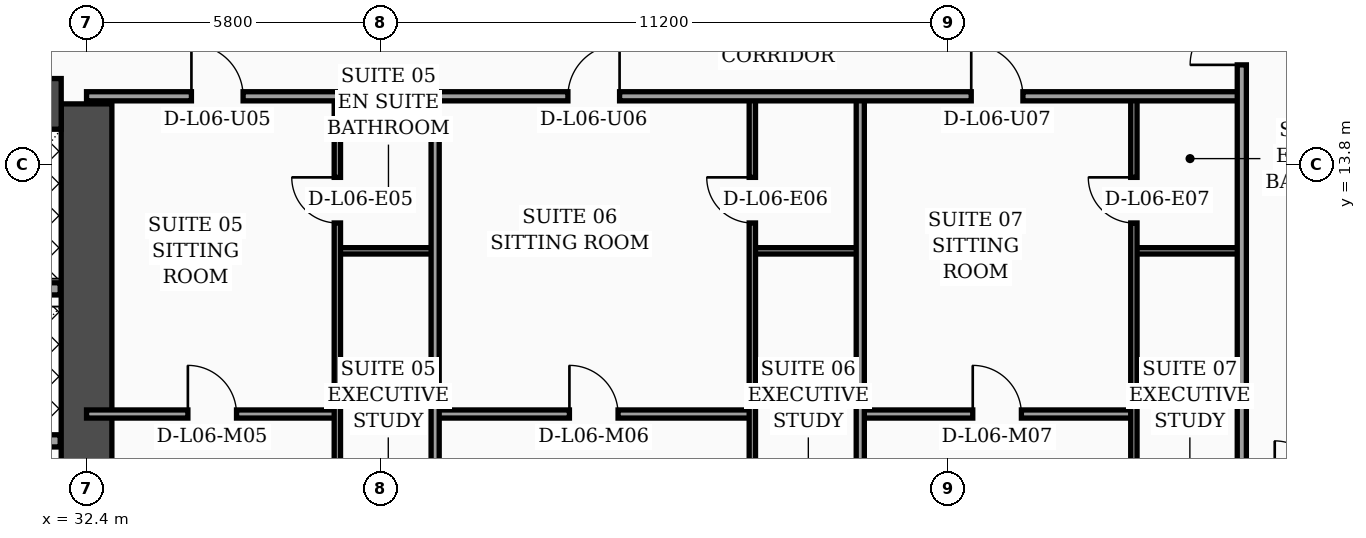
"""IFC4 building model, lengths in metres.
Left out: names, types, materials, properties, quantities, classifications, styles, units other than length and angle.
Written with IfcOpenShell. Run it as: python <this file> out.ifc"""

import sys

from ifc_helpers import new_model, si_unit, direction, frame, frame_2d, origin, place, context, subcontext, project, spatial, rectangle, extrude, element, fill, save


model = new_model("IFC4")
c1 = context("Model", 3, precision=1e-05, world=origin(), true_north=direction((0.0, 1.0)))
c2 = subcontext(c1, "Body", "Model", "MODEL_VIEW")
j1 = project(units=[si_unit("LENGTHUNIT", "METRE"), si_unit("PLANEANGLEUNIT", "RADIAN")], contexts=[c1])
p1 = place(None, origin())
s1 = spatial("IfcSite", under=j1, at=p1, CompositionType="ELEMENT")
p2 = place(p1, origin())
s2 = spatial("IfcBuilding", under=s1, at=p2, CompositionType="ELEMENT")
p3 = place(p2, frame((0.0, 0.0, 30.8)))
s3 = spatial("IfcBuildingStorey", under=s2, at=p3, CompositionType="ELEMENT", Elevation=30.8)
p4 = place(p3, frame((32.4, 4.6, 0.0), z_axis=(0.0, 0.0, 1.0), x_axis=(0.0, 1.0, 0.0)))
e1 = element("IfcWall", 1, at=p4, inside=s3, PredefinedType="SHEAR", context=c2, shape_type="SweptSolid", body=[
    extrude(rectangle(XDim=10.4, YDim=1.0, at=frame_2d((5.2, 0.0))), origin(), (0.0, 0.0, 1.0), 3.56),
])
p5 = place(p3, frame((22.1, 15.0, 0.0), z_axis=(0.0, 0.0, 1.0), x_axis=(1.0, 0.0, 0.0)))
e2 = element("IfcWall", 2, at=p5, inside=s3, PredefinedType="SHEAR", context=c2, shape_type="SweptSolid", body=[
    extrude(rectangle(XDim=9.8, YDim=1.0, at=frame_2d((4.9, 0.0))), origin(), (0.0, 0.0, 1.0), 3.56),
])
p6 = place(p5, frame((4.8, 0.0, 0.0)))
e3 = element("IfcOpeningElement", 3, at=p6, cuts=e2, PredefinedType="OPENING", context=c2, shape_type="SweptSolid", body=[
    extrude(rectangle(XDim=1.1, YDim=2.2, at=frame_2d((0.55, 1.1))), frame((0.0, 0.51, 0.0), z_axis=(0.0, -1.0, 0.0), x_axis=(1.0, 0.0, 0.0)), (0.0, 0.0, 1.0), 1.02),
])
p7 = place(p3, frame((63.63, 5.505, 0.0), z_axis=(0.0, 0.0, 1.0), x_axis=(-0.300501856448, 0.953781229775, 0.0)))
e4 = element("IfcWall", 4, at=p7, inside=s3, PredefinedType="SOLIDWALL", context=c2, shape_type="SweptSolid", body=[
    extrude(rectangle(XDim=30.814, YDim=0.32, at=frame_2d((15.407, 0.0))), origin(), (0.0, 0.0, 1.0), 3.56),
])
p8 = place(p7, frame((4.747, 0.0, 0.0)))
e5 = element("IfcOpeningElement", 5, at=p8, cuts=e4, PredefinedType="OPENING", context=c2, shape_type="SweptSolid", body=[
    extrude(rectangle(XDim=1.4, YDim=2.25, at=frame_2d((0.7, 1.125))), frame((0.0, 0.17, 0.0), z_axis=(0.0, -1.0, 0.0), x_axis=(1.0, 0.0, 0.0)), (0.0, 0.0, 1.0), 0.34),
])
p9 = place(p7, frame((2.65, 0.0, 0.75)))
e6 = element("IfcOpeningElement", 6, at=p9, cuts=e4, PredefinedType="OPENING", context=c2, shape_type="SweptSolid", body=[
    extrude(rectangle(XDim=1.5, YDim=1.6, at=frame_2d((0.75, 0.8))), frame((0.0, 0.17, 0.0), z_axis=(0.0, -1.0, 0.0), x_axis=(1.0, 0.0, 0.0)), (0.0, 0.0, 1.0), 0.34),
])
p10 = place(p7, frame((7.8, 0.0, 0.75)))
e7 = element("IfcOpeningElement", 7, at=p10, cuts=e4, PredefinedType="OPENING", context=c2, shape_type="SweptSolid", body=[
    extrude(rectangle(XDim=1.5, YDim=1.6, at=frame_2d((0.75, 0.8))), frame((0.0, 0.17, 0.0), z_axis=(0.0, -1.0, 0.0), x_axis=(1.0, 0.0, 0.0)), (0.0, 0.0, 1.0), 0.34),
])
p11 = place(p7, frame((10.9, 0.0, 0.75)))
e8 = element("IfcOpeningElement", 8, at=p11, cuts=e4, PredefinedType="OPENING", context=c2, shape_type="SweptSolid", body=[
    extrude(rectangle(XDim=1.5, YDim=1.6, at=frame_2d((0.75, 0.8))), frame((0.0, 0.17, 0.0), z_axis=(0.0, -1.0, 0.0), x_axis=(1.0, 0.0, 0.0)), (0.0, 0.0, 1.0), 0.34),
])
p12 = place(p7, frame((14.0, 0.0, 0.75)))
e9 = element("IfcOpeningElement", 9, at=p12, cuts=e4, PredefinedType="OPENING", context=c2, shape_type="SweptSolid", body=[
    extrude(rectangle(XDim=1.5, YDim=1.6, at=frame_2d((0.75, 0.8))), frame((0.0, 0.17, 0.0), z_axis=(0.0, -1.0, 0.0), x_axis=(1.0, 0.0, 0.0)), (0.0, 0.0, 1.0), 0.34),
])
p13 = place(p7, frame((17.1, 0.0, 0.75)))
e10 = element("IfcOpeningElement", 10, at=p13, cuts=e4, PredefinedType="OPENING", context=c2, shape_type="SweptSolid", body=[
    extrude(rectangle(XDim=1.5, YDim=1.6, at=frame_2d((0.75, 0.8))), frame((0.0, 0.17, 0.0), z_axis=(0.0, -1.0, 0.0), x_axis=(1.0, 0.0, 0.0)), (0.0, 0.0, 1.0), 0.34),
])
p14 = place(p7, frame((20.2, 0.0, 0.75)))
e11 = element("IfcOpeningElement", 11, at=p14, cuts=e4, PredefinedType="OPENING", context=c2, shape_type="SweptSolid", body=[
    extrude(rectangle(XDim=1.5, YDim=1.6, at=frame_2d((0.75, 0.8))), frame((0.0, 0.17, 0.0), z_axis=(0.0, -1.0, 0.0), x_axis=(1.0, 0.0, 0.0)), (0.0, 0.0, 1.0), 0.34),
])
p15 = place(p7, frame((23.3, 0.0, 0.75)))
e12 = element("IfcOpeningElement", 12, at=p15, cuts=e4, PredefinedType="OPENING", context=c2, shape_type="SweptSolid", body=[
    extrude(rectangle(XDim=1.5, YDim=1.6, at=frame_2d((0.75, 0.8))), frame((0.0, 0.17, 0.0), z_axis=(0.0, -1.0, 0.0), x_axis=(1.0, 0.0, 0.0)), (0.0, 0.0, 1.0), 0.34),
])
p16 = place(p7, frame((26.4, 0.0, 0.75)))
e13 = element("IfcOpeningElement", 13, at=p16, cuts=e4, PredefinedType="OPENING", context=c2, shape_type="SweptSolid", body=[
    extrude(rectangle(XDim=1.5, YDim=1.6, at=frame_2d((0.75, 0.8))), frame((0.0, 0.17, 0.0), z_axis=(0.0, -1.0, 0.0), x_axis=(1.0, 0.0, 0.0)), (0.0, 0.0, 1.0), 0.34),
])
p17 = place(p3, frame((27.02, 11.35, 0.0), z_axis=(0.0, 0.0, 1.0), x_axis=(1.0, 0.0, 0.0)))
e14 = element("IfcWall", 14, at=p17, inside=s3, PredefinedType="SOLIDWALL", context=c2, shape_type="SweptSolid", body=[
    extrude(rectangle(XDim=4.86, YDim=0.24, at=frame_2d((2.43, 0.0))), origin(), (0.0, 0.0, 1.0), 3.56),
])
p18 = place(p17, frame((0.45, 0.0, 0.0)))
e15 = element("IfcOpeningElement", 15, at=p18, cuts=e14, PredefinedType="OPENING", context=c2, shape_type="SweptSolid", body=[
    extrude(rectangle(XDim=1.3, YDim=2.35, at=frame_2d((0.65, 1.175))), frame((0.0, 0.13, 0.0), z_axis=(0.0, -1.0, 0.0), x_axis=(1.0, 0.0, 0.0)), (0.0, 0.0, 1.0), 0.26),
])
p19 = place(p3, frame((27.02, 8.35, 0.0), z_axis=(0.0, 0.0, 1.0), x_axis=(1.0, 0.0, 0.0)))
e16 = element("IfcWall", 16, at=p19, inside=s3, PredefinedType="SOLIDWALL", context=c2, shape_type="SweptSolid", body=[
    extrude(rectangle(XDim=4.86, YDim=0.24, at=frame_2d((2.43, 0.0))), origin(), (0.0, 0.0, 1.0), 3.56),
])
p20 = place(p3, frame((37.35, 12.1, 0.0), z_axis=(0.0, 0.0, 1.0), x_axis=(1.0, 0.0, 0.0)))
e17 = element("IfcWall", 17, at=p20, inside=s3, PredefinedType="PARTITIONING", context=c2, shape_type="SweptSolid", body=[
    extrude(rectangle(XDim=1.93, YDim=0.125, at=frame_2d((0.965, 0.0))), origin(), (0.0, 0.0, 1.0), 3.56),
])
p21 = place(p3, frame((32.4, 8.88, 0.0), z_axis=(0.0, 0.0, 1.0), x_axis=(1.0, 0.0, 0.0)))
e18 = element("IfcWall", 18, at=p21, inside=s3, PredefinedType="PARTITIONING", context=c2, shape_type="SweptSolid", body=[
    extrude(rectangle(XDim=4.95, YDim=0.16, at=frame_2d((2.475, 0.0))), origin(), (0.0, 0.0, 1.0), 2.84),
])
p22 = place(p21, frame((2.0, 0.0, 0.0)))
e19 = element("IfcOpeningElement", 19, at=p22, cuts=e18, PredefinedType="OPENING", context=c2, shape_type="SweptSolid", body=[
    extrude(rectangle(XDim=0.96, YDim=2.2, at=frame_2d((0.48, 1.1))), frame((0.0, 0.09, 0.0), z_axis=(0.0, -1.0, 0.0), x_axis=(1.0, 0.0, 0.0)), (0.0, 0.0, 1.0), 0.18),
])
p23 = place(p3, frame((37.35, 2.44, 0.0), z_axis=(0.0, 0.0, 1.0), x_axis=(0.0, 1.0, 0.0)))
e20 = element("IfcWall", 20, at=p23, inside=s3, PredefinedType="PARTITIONING", context=c2, shape_type="SweptSolid", body=[
    extrude(rectangle(XDim=12.71, YDim=0.125, at=frame_2d((6.355, 0.0))), origin(), (0.0, 0.0, 1.0), 2.84),
])
p24 = place(p23, frame((4.35, 0.0, 0.0)))
e21 = element("IfcOpeningElement", 21, at=p24, cuts=e20, PredefinedType="OPENING", context=c2, shape_type="SweptSolid", body=[
    extrude(rectangle(XDim=0.96, YDim=2.2, at=frame_2d((0.48, 1.1))), frame((0.0, 0.073, 0.0), z_axis=(0.0, -1.0, 0.0), x_axis=(1.0, 0.0, 0.0)), (0.0, 0.0, 1.0), 0.145),
])
p25 = place(p23, frame((10.21, 0.0, 0.0)))
e22 = element("IfcOpeningElement", 22, at=p25, cuts=e20, PredefinedType="OPENING", context=c2, shape_type="SweptSolid", body=[
    extrude(rectangle(XDim=0.9, YDim=2.15, at=frame_2d((0.45, 1.075))), frame((0.0, 0.073, 0.0), z_axis=(0.0, -1.0, 0.0), x_axis=(1.0, 0.0, 0.0)), (0.0, 0.0, 1.0), 0.145),
])
p26 = place(p3, frame((45.54, 12.1, 0.0), z_axis=(0.0, 0.0, 1.0), x_axis=(1.0, 0.0, 0.0)))
e23 = element("IfcWall", 23, at=p26, inside=s3, PredefinedType="PARTITIONING", context=c2, shape_type="SweptSolid", body=[
    extrude(rectangle(XDim=2.13, YDim=0.125, at=frame_2d((1.065, 0.0))), origin(), (0.0, 0.0, 1.0), 2.84),
])
p27 = place(p3, frame((39.28, 8.88, 0.0), z_axis=(0.0, 0.0, 1.0), x_axis=(1.0, 0.0, 0.0)))
e24 = element("IfcWall", 24, at=p27, inside=s3, PredefinedType="PARTITIONING", context=c2, shape_type="SweptSolid", body=[
    extrude(rectangle(XDim=6.26, YDim=0.16, at=frame_2d((3.13, 0.0))), origin(), (0.0, 0.0, 1.0), 3.56),
])
p28 = place(p27, frame((2.65, 0.0, 0.0)))
e25 = element("IfcOpeningElement", 25, at=p28, cuts=e24, PredefinedType="OPENING", context=c2, shape_type="SweptSolid", body=[
    extrude(rectangle(XDim=0.96, YDim=2.2, at=frame_2d((0.48, 1.1))), frame((0.0, 0.09, 0.0), z_axis=(0.0, -1.0, 0.0), x_axis=(1.0, 0.0, 0.0)), (0.0, 0.0, 1.0), 0.18),
])
p29 = place(p3, frame((45.54, 2.44, 0.0), z_axis=(0.0, 0.0, 1.0), x_axis=(0.0, 1.0, 0.0)))
e26 = element("IfcWall", 26, at=p29, inside=s3, PredefinedType="PARTITIONING", context=c2, shape_type="SweptSolid", body=[
    extrude(rectangle(XDim=12.71, YDim=0.125, at=frame_2d((6.355, 0.0))), origin(), (0.0, 0.0, 1.0), 3.04),
])
p30 = place(p29, frame((4.35, 0.0, 0.0)))
e27 = element("IfcOpeningElement", 27, at=p30, cuts=e26, PredefinedType="OPENING", context=c2, shape_type="SweptSolid", body=[
    extrude(rectangle(XDim=0.96, YDim=2.2, at=frame_2d((0.48, 1.1))), frame((0.0, 0.073, 0.0), z_axis=(0.0, -1.0, 0.0), x_axis=(1.0, 0.0, 0.0)), (0.0, 0.0, 1.0), 0.145),
])
p31 = place(p29, frame((10.21, 0.0, 0.0)))
e28 = element("IfcOpeningElement", 28, at=p31, cuts=e26, PredefinedType="OPENING", context=c2, shape_type="SweptSolid", body=[
    extrude(rectangle(XDim=0.9, YDim=2.15, at=frame_2d((0.45, 1.075))), frame((0.0, 0.073, 0.0), z_axis=(0.0, -1.0, 0.0), x_axis=(1.0, 0.0, 0.0)), (0.0, 0.0, 1.0), 0.145),
])
p32 = place(p3, frame((39.28, 2.44, 0.0), z_axis=(0.0, 0.0, 1.0), x_axis=(0.0, 1.0, 0.0)))
e29 = element("IfcWall", 29, at=p32, inside=s3, PredefinedType="PARTITIONING", context=c2, shape_type="SweptSolid", body=[
    extrude(rectangle(XDim=12.71, YDim=0.16, at=frame_2d((6.355, 0.0))), origin(), (0.0, 0.0, 1.0), 2.84),
])
p33 = place(p3, frame((53.07, 12.1, 0.0), z_axis=(0.0, 0.0, 1.0), x_axis=(1.0, 0.0, 0.0)))
e30 = element("IfcWall", 30, at=p33, inside=s3, PredefinedType="PARTITIONING", context=c2, shape_type="SweptSolid", body=[
    extrude(rectangle(XDim=2.13, YDim=0.125, at=frame_2d((1.065, 0.0))), origin(), (0.0, 0.0, 1.0), 3.56),
])
p34 = place(p3, frame((47.67, 8.88, 0.0), z_axis=(0.0, 0.0, 1.0), x_axis=(1.0, 0.0, 0.0)))
e31 = element("IfcWall", 31, at=p34, inside=s3, PredefinedType="PARTITIONING", context=c2, shape_type="SweptSolid", body=[
    extrude(rectangle(XDim=5.4, YDim=0.16, at=frame_2d((2.7, 0.0))), origin(), (0.0, 0.0, 1.0), 2.84),
])
p35 = place(p34, frame((2.22, 0.0, 0.0)))
e32 = element("IfcOpeningElement", 32, at=p35, cuts=e31, PredefinedType="OPENING", context=c2, shape_type="SweptSolid", body=[
    extrude(rectangle(XDim=0.96, YDim=2.2, at=frame_2d((0.48, 1.1))), frame((0.0, 0.09, 0.0), z_axis=(0.0, -1.0, 0.0), x_axis=(1.0, 0.0, 0.0)), (0.0, 0.0, 1.0), 0.18),
])
p36 = place(p3, frame((53.07, 2.44, 0.0), z_axis=(0.0, 0.0, 1.0), x_axis=(0.0, 1.0, 0.0)))
e33 = element("IfcWall", 33, at=p36, inside=s3, PredefinedType="PARTITIONING", context=c2, shape_type="SweptSolid", body=[
    extrude(rectangle(XDim=12.71, YDim=0.125, at=frame_2d((6.355, 0.0))), origin(), (0.0, 0.0, 1.0), 3.04),
])
p37 = place(p36, frame((4.35, 0.0, 0.0)))
e34 = element("IfcOpeningElement", 34, at=p37, cuts=e33, PredefinedType="OPENING", context=c2, shape_type="SweptSolid", body=[
    extrude(rectangle(XDim=0.96, YDim=2.2, at=frame_2d((0.48, 1.1))), frame((0.0, 0.073, 0.0), z_axis=(0.0, -1.0, 0.0), x_axis=(1.0, 0.0, 0.0)), (0.0, 0.0, 1.0), 0.145),
])
p38 = place(p36, frame((10.21, 0.0, 0.0)))
e35 = element("IfcOpeningElement", 35, at=p38, cuts=e33, PredefinedType="OPENING", context=c2, shape_type="SweptSolid", body=[
    extrude(rectangle(XDim=0.9, YDim=2.15, at=frame_2d((0.45, 1.075))), frame((0.0, 0.073, 0.0), z_axis=(0.0, -1.0, 0.0), x_axis=(1.0, 0.0, 0.0)), (0.0, 0.0, 1.0), 0.145),
])
p39 = place(p3, frame((47.67, 2.44, 0.0), z_axis=(0.0, 0.0, 1.0), x_axis=(0.0, 1.0, 0.0)))
e36 = element("IfcWall", 36, at=p39, inside=s3, PredefinedType="PARTITIONING", context=c2, shape_type="SweptSolid", body=[
    extrude(rectangle(XDim=12.71, YDim=0.16, at=frame_2d((6.355, 0.0))), origin(), (0.0, 0.0, 1.0), 2.84),
])
p40 = place(p3, frame((32.4, 15.15, 0.0), z_axis=(0.0, 0.0, 1.0), x_axis=(1.0, 0.0, 0.0)))
e37 = element("IfcWall", 37, at=p40, inside=s3, PredefinedType="PARTITIONING", context=c2, shape_type="SweptSolid", body=[
    extrude(rectangle(XDim=22.8, YDim=0.18, at=frame_2d((11.4, 0.0))), origin(), (0.0, 0.0, 1.0), 2.84),
])
p41 = place(p40, frame((2.07, 0.0, 0.0)))
e38 = element("IfcOpeningElement", 38, at=p41, cuts=e37, PredefinedType="OPENING", context=c2, shape_type="SweptSolid", body=[
    extrude(rectangle(XDim=1.02, YDim=2.2, at=frame_2d((0.51, 1.1))), frame((0.0, 0.1, 0.0), z_axis=(0.0, -1.0, 0.0), x_axis=(1.0, 0.0, 0.0)), (0.0, 0.0, 1.0), 0.2),
])
p42 = place(p40, frame((9.5, 0.0, 0.0)))
e39 = element("IfcOpeningElement", 39, at=p42, cuts=e37, PredefinedType="OPENING", context=c2, shape_type="SweptSolid", body=[
    extrude(rectangle(XDim=1.02, YDim=2.2, at=frame_2d((0.51, 1.1))), frame((0.0, 0.1, 0.0), z_axis=(0.0, -1.0, 0.0), x_axis=(1.0, 0.0, 0.0)), (0.0, 0.0, 1.0), 0.2),
])
p43 = place(p40, frame((17.46, 0.0, 0.0)))
e40 = element("IfcOpeningElement", 40, at=p43, cuts=e37, PredefinedType="OPENING", context=c2, shape_type="SweptSolid", body=[
    extrude(rectangle(XDim=1.02, YDim=2.2, at=frame_2d((0.51, 1.1))), frame((0.0, 0.1, 0.0), z_axis=(0.0, -1.0, 0.0), x_axis=(1.0, 0.0, 0.0)), (0.0, 0.0, 1.0), 0.2),
])
p44 = place(p3, frame((55.2, 2.44, 0.0), z_axis=(0.0, 0.0, 1.0), x_axis=(0.0, 1.0, 0.0)))
e41 = element("IfcWall", 41, at=p44, inside=s3, PredefinedType="PARTITIONING", context=c2, shape_type="SweptSolid", body=[
    extrude(rectangle(XDim=15.56, YDim=0.18, at=frame_2d((7.78, 0.0))), origin(), (0.0, 0.0, 1.0), 3.04),
])
p45 = place(p44, frame((13.33, 0.0, 0.0)))
e42 = element("IfcOpeningElement", 42, at=p45, cuts=e41, PredefinedType="OPENING", context=c2, shape_type="SweptSolid", body=[
    extrude(rectangle(XDim=1.02, YDim=2.2, at=frame_2d((0.51, 1.1))), frame((0.0, 0.1, 0.0), z_axis=(0.0, -1.0, 0.0), x_axis=(1.0, 0.0, 0.0)), (0.0, 0.0, 1.0), 0.2),
])
p46 = place(p22, origin())
e43 = element("IfcDoor", 43, at=p46, inside=s3, OperationType="SINGLE_SWING_LEFT", PredefinedType="DOOR", context=c2, shape_type="SweptSolid", body=[
    extrude(rectangle(XDim=0.96, YDim=2.2, at=frame_2d((0.48, 1.1))), frame((0.0, 0.025, 0.0), z_axis=(0.0, -1.0, 0.0), x_axis=(1.0, 0.0, 0.0)), (0.0, 0.0, 1.0), 0.05),
])
fill(e19, e43)
p47 = place(p25, origin())
e44 = element("IfcDoor", 44, at=p47, inside=s3, OperationType="SINGLE_SWING_RIGHT", PredefinedType="DOOR", context=c2, shape_type="SweptSolid", body=[
    extrude(rectangle(XDim=0.9, YDim=2.15, at=frame_2d((0.45, 1.075))), frame((0.0, 0.025, 0.0), z_axis=(0.0, -1.0, 0.0), x_axis=(1.0, 0.0, 0.0)), (0.0, 0.0, 1.0), 0.05),
])
fill(e22, e44)
p48 = place(p28, origin())
e45 = element("IfcDoor", 45, at=p48, inside=s3, OperationType="SINGLE_SWING_LEFT", PredefinedType="DOOR", context=c2, shape_type="SweptSolid", body=[
    extrude(rectangle(XDim=0.96, YDim=2.2, at=frame_2d((0.48, 1.1))), frame((0.0, 0.025, 0.0), z_axis=(0.0, -1.0, 0.0), x_axis=(1.0, 0.0, 0.0)), (0.0, 0.0, 1.0), 0.05),
])
fill(e25, e45)
p49 = place(p31, origin())
e46 = element("IfcDoor", 46, at=p49, inside=s3, OperationType="SINGLE_SWING_RIGHT", PredefinedType="DOOR", context=c2, shape_type="SweptSolid", body=[
    extrude(rectangle(XDim=0.9, YDim=2.15, at=frame_2d((0.45, 1.075))), frame((0.0, 0.025, 0.0), z_axis=(0.0, -1.0, 0.0), x_axis=(1.0, 0.0, 0.0)), (0.0, 0.0, 1.0), 0.05),
])
fill(e28, e46)
p50 = place(p35, origin())
e47 = element("IfcDoor", 47, at=p50, inside=s3, OperationType="SINGLE_SWING_LEFT", PredefinedType="DOOR", context=c2, shape_type="SweptSolid", body=[
    extrude(rectangle(XDim=0.96, YDim=2.2, at=frame_2d((0.48, 1.1))), frame((0.0, 0.025, 0.0), z_axis=(0.0, -1.0, 0.0), x_axis=(1.0, 0.0, 0.0)), (0.0, 0.0, 1.0), 0.05),
])
fill(e32, e47)
p51 = place(p38, origin())
e48 = element("IfcDoor", 48, at=p51, inside=s3, OperationType="SINGLE_SWING_RIGHT", PredefinedType="DOOR", context=c2, shape_type="SweptSolid", body=[
    extrude(rectangle(XDim=0.9, YDim=2.15, at=frame_2d((0.45, 1.075))), frame((0.0, 0.025, 0.0), z_axis=(0.0, -1.0, 0.0), x_axis=(1.0, 0.0, 0.0)), (0.0, 0.0, 1.0), 0.05),
])
fill(e35, e48)
p52 = place(p41, origin())
e49 = element("IfcDoor", 49, at=p52, inside=s3, OperationType="SINGLE_SWING_LEFT", PredefinedType="DOOR", context=c2, shape_type="SweptSolid", body=[
    extrude(rectangle(XDim=1.02, YDim=2.2, at=frame_2d((0.51, 1.1))), frame((0.0, 0.025, 0.0), z_axis=(0.0, -1.0, 0.0), x_axis=(1.0, 0.0, 0.0)), (0.0, 0.0, 1.0), 0.05),
])
fill(e38, e49)
p53 = place(p42, origin())
e50 = element("IfcDoor", 50, at=p53, inside=s3, OperationType="SINGLE_SWING_RIGHT", PredefinedType="DOOR", context=c2, shape_type="SweptSolid", body=[
    extrude(rectangle(XDim=1.02, YDim=2.2, at=frame_2d((0.51, 1.1))), frame((0.0, 0.025, 0.0), z_axis=(0.0, -1.0, 0.0), x_axis=(1.0, 0.0, 0.0)), (0.0, 0.0, 1.0), 0.05),
])
fill(e39, e50)
p54 = place(p43, origin())
e51 = element("IfcDoor", 51, at=p54, inside=s3, OperationType="SINGLE_SWING_LEFT", PredefinedType="DOOR", context=c2, shape_type="SweptSolid", body=[
    extrude(rectangle(XDim=1.02, YDim=2.2, at=frame_2d((0.51, 1.1))), frame((0.0, 0.025, 0.0), z_axis=(0.0, -1.0, 0.0), x_axis=(1.0, 0.0, 0.0)), (0.0, 0.0, 1.0), 0.05),
])
fill(e40, e51)
p55 = place(p45, origin())
e52 = element("IfcDoor", 52, at=p55, inside=s3, OperationType="SINGLE_SWING_LEFT", PredefinedType="DOOR", context=c2, shape_type="SweptSolid", body=[
    extrude(rectangle(XDim=1.02, YDim=2.2, at=frame_2d((0.51, 1.1))), frame((0.0, 0.025, 0.0), z_axis=(0.0, -1.0, 0.0), x_axis=(1.0, 0.0, 0.0)), (0.0, 0.0, 1.0), 0.05),
])
fill(e42, e52)
save(model, sys.argv[1])
